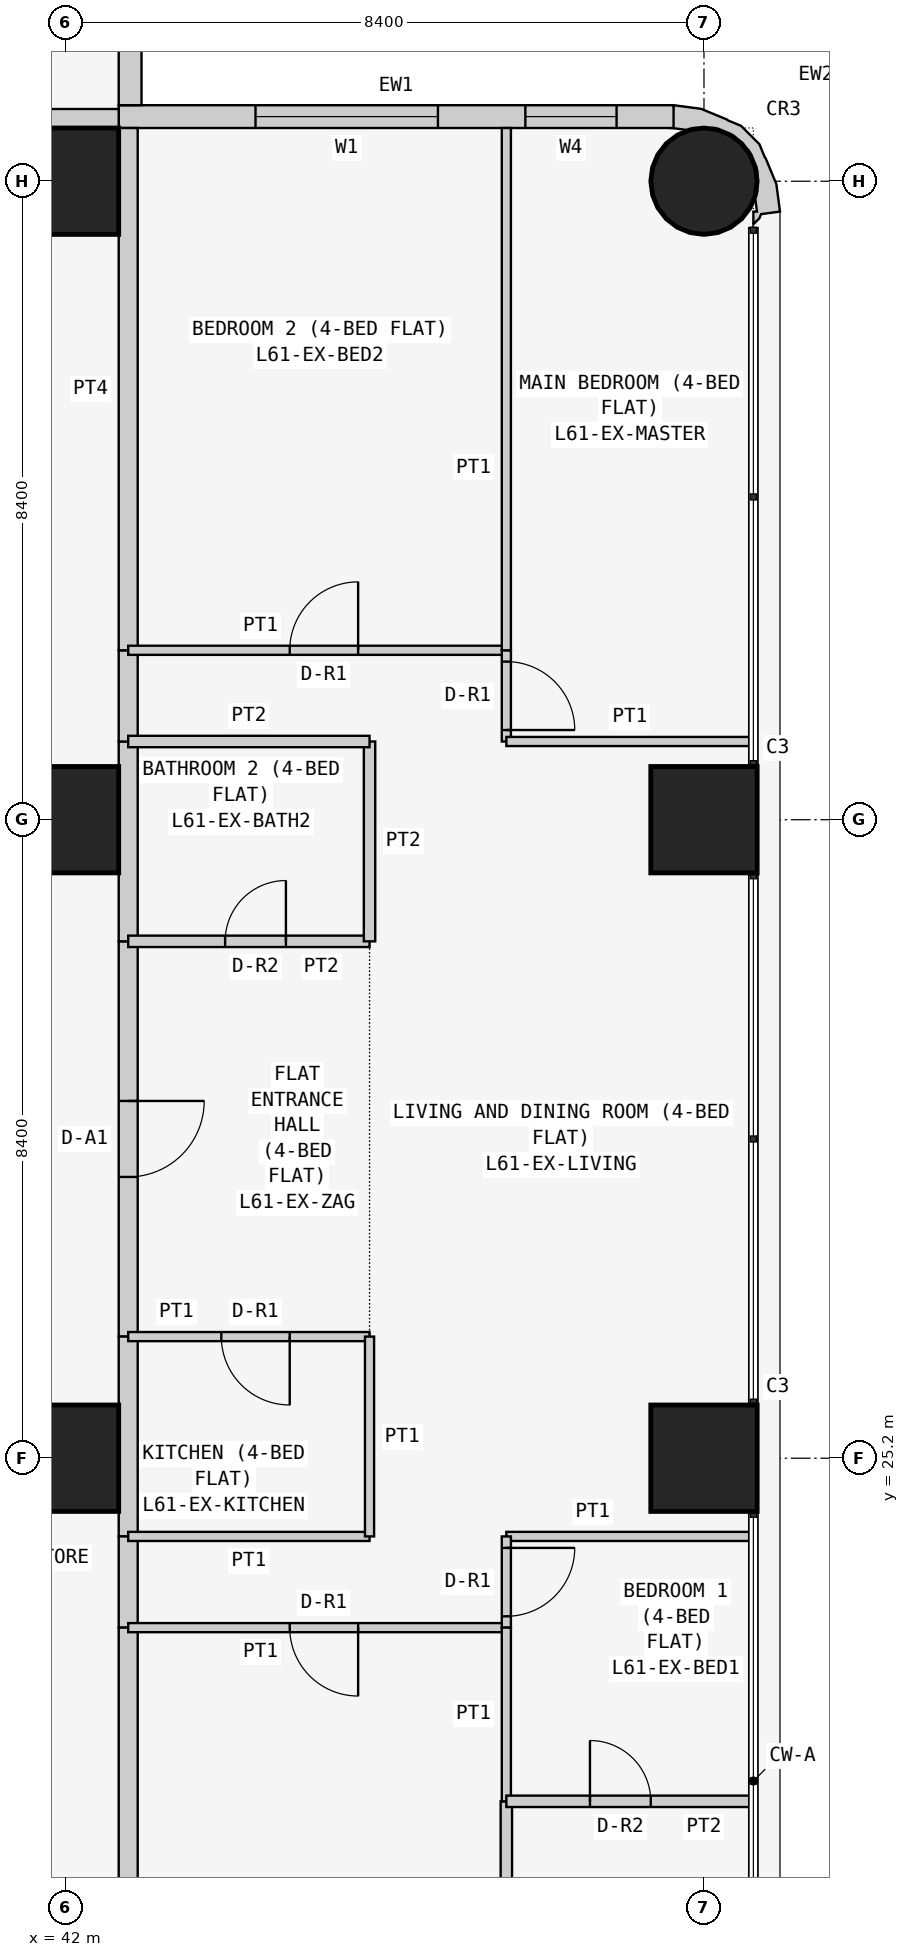
"""IFC4 building model, lengths in metres.
Left out: names, types, materials, properties, quantities, classifications, styles, units other than length and angle.
Written with IfcOpenShell. Run it as: python <this file> out.ifc"""

import sys

from ifc_helpers import new_model, si_unit, direction, frame, frame_2d, origin, origin_2d, place, context, subcontext, project, spatial, polyline, rectangle, circle, outline, extrude, element, fill, save


model = new_model("IFC4")
c1 = context("Model", 3, precision=1e-05, world=origin(), true_north=direction((0.0, 1.0)))
c2 = subcontext(c1, "Body", "Model", "MODEL_VIEW")
j1 = project(units=[si_unit("LENGTHUNIT", "METRE"), si_unit("PLANEANGLEUNIT", "RADIAN")], contexts=[c1])
p1 = place(None, origin())
s1 = spatial("IfcSite", under=j1, at=p1, CompositionType="ELEMENT")
p2 = place(p1, origin())
s2 = spatial("IfcBuilding", under=s1, at=p2, CompositionType="ELEMENT")
p3 = place(p2, frame((0.0, 0.0, 233.7)))
s3 = spatial("IfcBuildingStorey", under=s2, at=p3, CompositionType="ELEMENT", Elevation=233.7)
for number, where, z_axis, x_axis in (
    (1, (42.0, 25.2, 0.0), (0.0, 0.0, 1.0), (1.0, 0.0, 0.0)),
    (2, (42.0, 33.6, 0.0), (0.0, 0.0, 1.0), (1.0, 0.0, 0.0)),
    (3, (42.0, 42.0, 0.0), (0.0, 0.0, 1.0), (1.0, 0.0, 0.0)),
    (4, (50.4, 25.2, 0.0), (0.0, 0.0, 1.0), (1.0, 0.0, 0.0)),
    (5, (50.4, 33.6, 0.0), (0.0, 0.0, 1.0), (1.0, 0.0, 0.0)),
):
    element("IfcColumn", number, at=place(p3, frame(where, z_axis=z_axis, x_axis=x_axis)), inside=s3, PredefinedType="COLUMN", context=c2, shape_type="SweptSolid", body=[
        extrude(rectangle(XDim=1.4, YDim=1.4, at=origin_2d()), origin(), (0.0, 0.0, 1.0), 3.6),
    ])
p4 = place(p3, frame((50.4, 42.0, 0.0), z_axis=(0.0, 0.0, 1.0), x_axis=(1.0, 0.0, 0.0)))
e6 = element("IfcColumn", 6, at=p4, inside=s3, PredefinedType="COLUMN", context=c2, shape_type="SweptSolid", body=[
    extrude(circle(Radius=0.7, at=origin_2d()), origin(), (0.0, 0.0, 1.0), 3.6),
])
p5 = place(p3, frame((50.0, 42.85, 0.0), z_axis=(0.0, 0.0, 1.0), x_axis=(-1.0, 0.0, 0.0)))
e7 = element("IfcWall", 7, at=p5, inside=s3, PredefinedType="SOLIDWALL", context=c2, shape_type="SweptSolid", body=[
    extrude(rectangle(XDim=7.3, YDim=0.3, at=frame_2d((3.65, 0.0))), origin(), (0.0, 0.0, 1.0), 3.45),
])
p6 = place(p5, frame((3.1, 0.0, 0.9)))
e8 = element("IfcOpeningElement", 8, at=p6, cuts=e7, PredefinedType="OPENING", context=c2, shape_type="SweptSolid", body=[
    extrude(rectangle(XDim=2.4, YDim=1.5, at=frame_2d((1.2, 0.75))), frame((0.0, 0.16, 0.0), z_axis=(0.0, -1.0, 0.0), x_axis=(1.0, 0.0, 0.0)), (0.0, 0.0, 1.0), 0.32),
])
p7 = place(p5, frame((0.75, 0.0, 0.9)))
e9 = element("IfcOpeningElement", 9, at=p7, cuts=e7, PredefinedType="OPENING", context=c2, shape_type="SweptSolid", body=[
    extrude(rectangle(XDim=1.2, YDim=1.5, at=frame_2d((0.6, 0.75))), frame((0.0, 0.16, 0.0), z_axis=(0.0, -1.0, 0.0), x_axis=(1.0, 0.0, 0.0)), (0.0, 0.0, 1.0), 0.32),
])
p8 = place(p3, frame((42.85, 43.0, 0.0), z_axis=(0.0, 0.0, 1.0), x_axis=(0.0, 1.0, 0.0)))
e10 = element("IfcWall", 10, at=p8, inside=s3, PredefinedType="SOLIDWALL", context=c2, shape_type="SweptSolid", body=[
    extrude(rectangle(XDim=7.0, YDim=0.3, at=frame_2d((3.5, 0.0))), origin(), (0.0, 0.0, 1.0), 3.45),
])
p9 = place(p8, frame((1.5, 0.0, 0.9)))
e11 = element("IfcOpeningElement", 11, at=p9, cuts=e10, PredefinedType="OPENING", context=c2, shape_type="SweptSolid", body=[
    extrude(rectangle(XDim=2.4, YDim=1.5, at=frame_2d((1.2, 0.75))), frame((0.0, 0.16, 0.0), z_axis=(0.0, -1.0, 0.0), x_axis=(1.0, 0.0, 0.0)), (0.0, 0.0, 1.0), 0.32),
])
p10 = place(p8, frame((5.05, 0.0, 0.9)))
e12 = element("IfcOpeningElement", 12, at=p10, cuts=e10, PredefinedType="OPENING", context=c2, shape_type="SweptSolid", body=[
    extrude(rectangle(XDim=1.2, YDim=1.5, at=frame_2d((0.6, 0.75))), frame((0.0, 0.16, 0.0), z_axis=(0.0, -1.0, 0.0), x_axis=(1.0, 0.0, 0.0)), (0.0, 0.0, 1.0), 0.32),
])
p11 = place(p3, frame((50.988, 41.488, 0.0), z_axis=(0.0, 0.0, 1.0), x_axis=(0.898030234854, 0.439933741929, 0.0)))
e13 = element("IfcWall", 13, at=p11, inside=s3, PredefinedType="SOLIDWALL", context=c2, shape_type="SweptSolid", body=[
    extrude(outline(polyline([(0.138, -0.04), (0.182, -0.0), (0.419, -0.08), (0.536, 0.266), (0.559, 0.631), (0.555, 0.651), (0.566, 0.836), (0.455, 1.159), (0.333, 1.298), (0.324, 1.317), (0.082, 1.591), (-0.222, 1.793), (-0.39, 1.541), (-0.372, 1.532), (-0.195, 1.414), (-0.12, 1.41), (0.131, 1.287), (0.315, 1.078), (0.406, 0.814), (0.388, 0.536), (0.265, 0.285), (0.209, 0.235), (0.148, 0.053), (0.105, 0.074), (0.032, -0.076), (0.138, -0.04)])), origin(), (0.0, 0.0, 1.0), 3.45),
])
p12 = place(p3, frame((35.829, 42.825, 0.0), z_axis=(0.0, 0.0, 1.0), x_axis=(1.0, 0.0, 0.0)))
e14 = element("IfcWall", 14, at=p12, inside=s3, PredefinedType="PARTITIONING", context=c2, shape_type="SweptSolid", body=[
    extrude(rectangle(XDim=6.871, YDim=0.25, at=frame_2d((3.436, 0.0))), origin(), (0.0, 0.0, 1.0), 3.45),
])
p13 = place(p3, frame((42.825, 32.0, 0.0), z_axis=(0.0, 0.0, 1.0), x_axis=(0.0, -1.0, 0.0)))
e15 = element("IfcWall", 15, at=p13, inside=s3, PredefinedType="PARTITIONING", context=c2, shape_type="SweptSolid", body=[
    extrude(rectangle(XDim=5.2, YDim=0.25, at=frame_2d((2.6, 0.0))), origin(), (0.0, 0.0, 1.0), 3.45),
])
p14 = place(p13, frame((2.1, 0.0, 0.0)))
e16 = element("IfcOpeningElement", 16, at=p14, cuts=e15, PredefinedType="OPENING", context=c2, shape_type="SweptSolid", body=[
    extrude(rectangle(XDim=1.0, YDim=2.1, at=frame_2d((0.5, 1.05))), frame((0.0, 0.135, 0.0), z_axis=(0.0, -1.0, 0.0), x_axis=(1.0, 0.0, 0.0)), (0.0, 0.0, 1.0), 0.27),
])
p15 = place(p3, frame((42.825, 34.629, 0.0), z_axis=(0.0, 0.0, 1.0), x_axis=(0.0, -1.0, 0.0)))
e17 = element("IfcWall", 17, at=p15, inside=s3, PredefinedType="PARTITIONING", context=c2, shape_type="SweptSolid", body=[
    extrude(rectangle(XDim=2.629, YDim=0.25, at=frame_2d((1.314, 0.0))), origin(), (0.0, 0.0, 1.0), 3.45),
])
p16 = place(p3, frame((42.825, 26.8, 0.0), z_axis=(0.0, 0.0, 1.0), x_axis=(0.0, -1.0, 0.0)))
e18 = element("IfcWall", 18, at=p16, inside=s3, PredefinedType="PARTITIONING", context=c2, shape_type="SweptSolid", body=[
    extrude(rectangle(XDim=2.629, YDim=0.25, at=frame_2d((1.314, 0.0))), origin(), (0.0, 0.0, 1.0), 3.45),
])
p17 = place(p3, frame((42.825, 24.171, 0.0), z_axis=(0.0, 0.0, 1.0), x_axis=(0.0, -1.0, 0.0)))
e19 = element("IfcWall", 19, at=p17, inside=s3, PredefinedType="PARTITIONING", context=c2, shape_type="SweptSolid", body=[
    extrude(rectangle(XDim=1.2, YDim=0.25, at=frame_2d((0.6, 0.0))), origin(), (0.0, 0.0, 1.0), 3.45),
])
p18 = place(p3, frame((42.825, 35.829, 0.0), z_axis=(0.0, 0.0, 1.0), x_axis=(0.0, -1.0, 0.0)))
e20 = element("IfcWall", 20, at=p18, inside=s3, PredefinedType="PARTITIONING", context=c2, shape_type="SweptSolid", body=[
    extrude(rectangle(XDim=1.2, YDim=0.25, at=frame_2d((0.6, 0.0))), origin(), (0.0, 0.0, 1.0), 3.45),
])
for number, where, z_axis, x_axis in (
    (21, (42.825, 42.7, 0.0), (0.0, 0.0, 1.0), (0.0, -1.0, 0.0)),
    (22, (42.825, 22.971, 0.0), (0.0, 0.0, 1.0), (0.0, -1.0, 0.0)),
):
    element("IfcWall", number, at=place(p3, frame(where, z_axis=z_axis, x_axis=x_axis)), inside=s3, PredefinedType="PARTITIONING", context=c2, shape_type="SweptSolid", body=[
        extrude(rectangle(XDim=6.871, YDim=0.25, at=frame_2d((3.436, 0.0))), origin(), (0.0, 0.0, 1.0), 3.45),
    ])
p19 = place(p3, frame((46.0, 32.0, 0.0), z_axis=(0.0, 0.0, 1.0), x_axis=(-1.0, 0.0, 0.0)))
e23 = element("IfcWall", 23, at=p19, inside=s3, PredefinedType="PARTITIONING", context=c2, shape_type="SweptSolid", body=[
    extrude(rectangle(XDim=3.175, YDim=0.15, at=frame_2d((1.587, 0.0))), origin(), (0.0, 0.0, 1.0), 3.45),
])
p20 = place(p19, frame((1.1, 0.0, 0.0)))
e24 = element("IfcOpeningElement", 24, at=p20, cuts=e23, PredefinedType="OPENING", context=c2, shape_type="SweptSolid", body=[
    extrude(rectangle(XDim=0.8, YDim=2.1, at=frame_2d((0.4, 1.05))), frame((0.0, 0.085, 0.0), z_axis=(0.0, -1.0, 0.0), x_axis=(1.0, 0.0, 0.0)), (0.0, 0.0, 1.0), 0.17),
])
p21 = place(p3, frame((42.825, 26.8, 0.0), z_axis=(0.0, 0.0, 1.0), x_axis=(1.0, 0.0, 0.0)))
e25 = element("IfcWall", 25, at=p21, inside=s3, PredefinedType="PARTITIONING", context=c2, shape_type="SweptSolid", body=[
    extrude(rectangle(XDim=3.175, YDim=0.12, at=frame_2d((1.587, 0.0))), origin(), (0.0, 0.0, 1.0), 3.45),
])
p22 = place(p21, frame((1.225, 0.0, 0.0)))
e26 = element("IfcOpeningElement", 26, at=p22, cuts=e25, PredefinedType="OPENING", context=c2, shape_type="SweptSolid", body=[
    extrude(rectangle(XDim=0.9, YDim=2.1, at=frame_2d((0.45, 1.05))), frame((0.0, 0.07, 0.0), z_axis=(0.0, -1.0, 0.0), x_axis=(1.0, 0.0, 0.0)), (0.0, 0.0, 1.0), 0.14),
])
p23 = place(p3, frame((46.0, 32.0, 0.0), z_axis=(0.0, 0.0, 1.0), x_axis=(0.0, 1.0, 0.0)))
e27 = element("IfcWall", 27, at=p23, inside=s3, PredefinedType="PARTITIONING", context=c2, shape_type="SweptSolid", body=[
    extrude(rectangle(XDim=2.629, YDim=0.15, at=frame_2d((1.314, 0.0))), origin(), (0.0, 0.0, 1.0), 3.45),
])
p24 = place(p3, frame((46.0, 34.629, 0.0), z_axis=(0.0, 0.0, 1.0), x_axis=(-1.0, 0.0, 0.0)))
e28 = element("IfcWall", 28, at=p24, inside=s3, PredefinedType="PARTITIONING", context=c2, shape_type="SweptSolid", body=[
    extrude(rectangle(XDim=3.175, YDim=0.15, at=frame_2d((1.587, 0.0))), origin(), (0.0, 0.0, 1.0), 3.45),
])
p25 = place(p3, frame((42.825, 24.171, 0.0), z_axis=(0.0, 0.0, 1.0), x_axis=(1.0, 0.0, 0.0)))
e29 = element("IfcWall", 29, at=p25, inside=s3, PredefinedType="PARTITIONING", context=c2, shape_type="SweptSolid", body=[
    extrude(rectangle(XDim=3.175, YDim=0.12, at=frame_2d((1.587, 0.0))), origin(), (0.0, 0.0, 1.0), 3.45),
])
p26 = place(p3, frame((46.0, 24.171, 0.0), z_axis=(0.0, 0.0, 1.0), x_axis=(0.0, 1.0, 0.0)))
e30 = element("IfcWall", 30, at=p26, inside=s3, PredefinedType="PARTITIONING", context=c2, shape_type="SweptSolid", body=[
    extrude(rectangle(XDim=2.629, YDim=0.12, at=frame_2d((1.314, 0.0))), origin(), (0.0, 0.0, 1.0), 3.45),
])
p27 = place(p3, frame((42.825, 35.829, 0.0), z_axis=(0.0, 0.0, 1.0), x_axis=(1.0, 0.0, 0.0)))
e31 = element("IfcWall", 31, at=p27, inside=s3, PredefinedType="PARTITIONING", context=c2, shape_type="SweptSolid", body=[
    extrude(rectangle(XDim=4.975, YDim=0.12, at=frame_2d((2.488, 0.0))), origin(), (0.0, 0.0, 1.0), 3.45),
])
p28 = place(p27, frame((2.125, 0.0, 0.0)))
e32 = element("IfcOpeningElement", 32, at=p28, cuts=e31, PredefinedType="OPENING", context=c2, shape_type="SweptSolid", body=[
    extrude(rectangle(XDim=0.9, YDim=2.1, at=frame_2d((0.45, 1.05))), frame((0.0, 0.07, 0.0), z_axis=(0.0, -1.0, 0.0), x_axis=(1.0, 0.0, 0.0)), (0.0, 0.0, 1.0), 0.14),
])
p29 = place(p3, frame((47.8, 35.829, 0.0), z_axis=(0.0, 0.0, 1.0), x_axis=(0.0, -1.0, 0.0)))
e33 = element("IfcWall", 33, at=p29, inside=s3, PredefinedType="PARTITIONING", context=c2, shape_type="SweptSolid", body=[
    extrude(rectangle(XDim=1.2, YDim=0.12, at=frame_2d((0.6, 0.0))), origin(), (0.0, 0.0, 1.0), 3.45),
])
p30 = place(p29, frame((0.149, 0.0, 0.0)))
e34 = element("IfcOpeningElement", 34, at=p30, cuts=e33, PredefinedType="OPENING", context=c2, shape_type="SweptSolid", body=[
    extrude(rectangle(XDim=0.9, YDim=2.1, at=frame_2d((0.45, 1.05))), frame((0.0, 0.07, 0.0), z_axis=(0.0, -1.0, 0.0), x_axis=(1.0, 0.0, 0.0)), (0.0, 0.0, 1.0), 0.14),
])
p31 = place(p3, frame((47.8, 34.629, 0.0), z_axis=(0.0, 0.0, 1.0), x_axis=(1.0, 0.0, 0.0)))
e35 = element("IfcWall", 35, at=p31, inside=s3, PredefinedType="PARTITIONING", context=c2, shape_type="SweptSolid", body=[
    extrude(rectangle(XDim=3.25, YDim=0.12, at=frame_2d((1.625, 0.0))), origin(), (0.0, 0.0, 1.0), 3.45),
])
p32 = place(p3, frame((47.8, 22.971, 0.0), z_axis=(0.0, 0.0, 1.0), x_axis=(-1.0, 0.0, 0.0)))
e36 = element("IfcWall", 36, at=p32, inside=s3, PredefinedType="PARTITIONING", context=c2, shape_type="SweptSolid", body=[
    extrude(rectangle(XDim=4.975, YDim=0.12, at=frame_2d((2.488, 0.0))), origin(), (0.0, 0.0, 1.0), 3.45),
])
p33 = place(p32, frame((1.95, 0.0, 0.0)))
e37 = element("IfcOpeningElement", 37, at=p33, cuts=e36, PredefinedType="OPENING", context=c2, shape_type="SweptSolid", body=[
    extrude(rectangle(XDim=0.9, YDim=2.1, at=frame_2d((0.45, 1.05))), frame((0.0, 0.07, 0.0), z_axis=(0.0, -1.0, 0.0), x_axis=(1.0, 0.0, 0.0)), (0.0, 0.0, 1.0), 0.14),
])
p34 = place(p3, frame((51.05, 24.171, 0.0), z_axis=(0.0, 0.0, 1.0), x_axis=(-1.0, 0.0, 0.0)))
e38 = element("IfcWall", 38, at=p34, inside=s3, PredefinedType="PARTITIONING", context=c2, shape_type="SweptSolid", body=[
    extrude(rectangle(XDim=3.25, YDim=0.12, at=frame_2d((1.625, 0.0))), origin(), (0.0, 0.0, 1.0), 3.45),
])
p35 = place(p3, frame((47.8, 24.171, 0.0), z_axis=(0.0, 0.0, 1.0), x_axis=(0.0, -1.0, 0.0)))
e39 = element("IfcWall", 39, at=p35, inside=s3, PredefinedType="PARTITIONING", context=c2, shape_type="SweptSolid", body=[
    extrude(rectangle(XDim=1.2, YDim=0.12, at=frame_2d((0.6, 0.0))), origin(), (0.0, 0.0, 1.0), 3.45),
])
p36 = place(p35, frame((0.151, 0.0, 0.0)))
e40 = element("IfcOpeningElement", 40, at=p36, cuts=e39, PredefinedType="OPENING", context=c2, shape_type="SweptSolid", body=[
    extrude(rectangle(XDim=0.9, YDim=2.1, at=frame_2d((0.45, 1.05))), frame((0.0, 0.07, 0.0), z_axis=(0.0, -1.0, 0.0), x_axis=(1.0, 0.0, 0.0)), (0.0, 0.0, 1.0), 0.14),
])
p37 = place(p3, frame((47.8, 35.829, 0.0), z_axis=(0.0, 0.0, 1.0), x_axis=(0.0, 1.0, 0.0)))
e41 = element("IfcWall", 41, at=p37, inside=s3, PredefinedType="PARTITIONING", context=c2, shape_type="SweptSolid", body=[
    extrude(rectangle(XDim=6.871, YDim=0.12, at=frame_2d((3.436, 0.0))), origin(), (0.0, 0.0, 1.0), 3.45),
])
p38 = place(p3, frame((47.8, 16.1, 0.0), z_axis=(0.0, 0.0, 1.0), x_axis=(0.0, 1.0, 0.0)))
e42 = element("IfcWall", 42, at=p38, inside=s3, PredefinedType="PARTITIONING", context=c2, shape_type="SweptSolid", body=[
    extrude(rectangle(XDim=4.586, YDim=0.15, at=frame_2d((2.293, 0.0))), origin(), (0.0, 0.0, 1.0), 3.45),
])
p39 = place(p3, frame((47.8, 20.686, 0.0), z_axis=(0.0, 0.0, 1.0), x_axis=(0.0, 1.0, 0.0)))
e43 = element("IfcWall", 43, at=p39, inside=s3, PredefinedType="PARTITIONING", context=c2, shape_type="SweptSolid", body=[
    extrude(rectangle(XDim=2.285, YDim=0.12, at=frame_2d((1.143, 0.0))), origin(), (0.0, 0.0, 1.0), 3.45),
])
p40 = place(p3, frame((51.05, 20.686, 0.0), z_axis=(0.0, 0.0, 1.0), x_axis=(-1.0, 0.0, 0.0)))
e44 = element("IfcWall", 44, at=p40, inside=s3, PredefinedType="PARTITIONING", context=c2, shape_type="SweptSolid", body=[
    extrude(rectangle(XDim=3.25, YDim=0.15, at=frame_2d((1.625, 0.0))), origin(), (0.0, 0.0, 1.0), 3.45),
])
p41 = place(p40, frame((1.35, 0.0, 0.0)))
e45 = element("IfcOpeningElement", 45, at=p41, cuts=e44, PredefinedType="OPENING", context=c2, shape_type="SweptSolid", body=[
    extrude(rectangle(XDim=0.8, YDim=2.1, at=frame_2d((0.4, 1.05))), frame((0.0, 0.085, 0.0), z_axis=(0.0, -1.0, 0.0), x_axis=(1.0, 0.0, 0.0)), (0.0, 0.0, 1.0), 0.17),
])
p42 = place(p6, origin())
e46 = element("IfcWindow", 46, at=p42, inside=s3, PartitioningType="SINGLE_PANEL", PredefinedType="WINDOW", context=c2, shape_type="SweptSolid", body=[
    extrude(rectangle(XDim=2.4, YDim=1.5, at=frame_2d((1.2, 0.75))), frame((0.0, 0.03, 0.0), z_axis=(0.0, -1.0, 0.0), x_axis=(1.0, 0.0, 0.0)), (0.0, 0.0, 1.0), 0.06),
])
fill(e8, e46)
p43 = place(p7, origin())
e47 = element("IfcWindow", 47, at=p43, inside=s3, PartitioningType="SINGLE_PANEL", PredefinedType="WINDOW", context=c2, shape_type="SweptSolid", body=[
    extrude(rectangle(XDim=1.2, YDim=1.5, at=frame_2d((0.6, 0.75))), frame((0.0, 0.03, 0.0), z_axis=(0.0, -1.0, 0.0), x_axis=(1.0, 0.0, 0.0)), (0.0, 0.0, 1.0), 0.06),
])
fill(e9, e47)
p44 = place(p14, origin())
e48 = element("IfcDoor", 48, at=p44, inside=s3, OperationType="SINGLE_SWING_LEFT", PredefinedType="DOOR", context=c2, shape_type="SweptSolid", body=[
    extrude(rectangle(XDim=1.0, YDim=2.1, at=frame_2d((0.5, 1.05))), frame((0.0, 0.025, 0.0), z_axis=(0.0, -1.0, 0.0), x_axis=(1.0, 0.0, 0.0)), (0.0, 0.0, 1.0), 0.05),
])
fill(e16, e48)
p45 = place(p20, frame((0.8, 0.0, 0.0), z_axis=(0.0, 0.0, 1.0), x_axis=(-1.0, 0.0, 0.0)))
e49 = element("IfcDoor", 49, at=p45, inside=s3, OperationType="SINGLE_SWING_RIGHT", PredefinedType="DOOR", context=c2, shape_type="SweptSolid", body=[
    extrude(rectangle(XDim=0.8, YDim=2.1, at=frame_2d((0.4, 1.05))), frame((0.0, 0.025, 0.0), z_axis=(0.0, -1.0, 0.0), x_axis=(1.0, 0.0, 0.0)), (0.0, 0.0, 1.0), 0.05),
])
fill(e24, e49)
p46 = place(p22, frame((0.9, 0.0, 0.0), z_axis=(0.0, 0.0, 1.0), x_axis=(-1.0, 0.0, 0.0)))
e50 = element("IfcDoor", 50, at=p46, inside=s3, OperationType="SINGLE_SWING_LEFT", PredefinedType="DOOR", context=c2, shape_type="SweptSolid", body=[
    extrude(rectangle(XDim=0.9, YDim=2.1, at=frame_2d((0.45, 1.05))), frame((0.0, 0.025, 0.0), z_axis=(0.0, -1.0, 0.0), x_axis=(1.0, 0.0, 0.0)), (0.0, 0.0, 1.0), 0.05),
])
fill(e26, e50)
p47 = place(p28, origin())
e51 = element("IfcDoor", 51, at=p47, inside=s3, OperationType="SINGLE_SWING_RIGHT", PredefinedType="DOOR", context=c2, shape_type="SweptSolid", body=[
    extrude(rectangle(XDim=0.9, YDim=2.1, at=frame_2d((0.45, 1.05))), frame((0.0, 0.025, 0.0), z_axis=(0.0, -1.0, 0.0), x_axis=(1.0, 0.0, 0.0)), (0.0, 0.0, 1.0), 0.05),
])
fill(e32, e51)
p48 = place(p30, origin())
e52 = element("IfcDoor", 52, at=p48, inside=s3, OperationType="SINGLE_SWING_RIGHT", PredefinedType="DOOR", context=c2, shape_type="SweptSolid", body=[
    extrude(rectangle(XDim=0.9, YDim=2.1, at=frame_2d((0.45, 1.05))), frame((0.0, 0.025, 0.0), z_axis=(0.0, -1.0, 0.0), x_axis=(1.0, 0.0, 0.0)), (0.0, 0.0, 1.0), 0.05),
])
fill(e34, e52)
p49 = place(p33, origin())
e53 = element("IfcDoor", 53, at=p49, inside=s3, OperationType="SINGLE_SWING_LEFT", PredefinedType="DOOR", context=c2, shape_type="SweptSolid", body=[
    extrude(rectangle(XDim=0.9, YDim=2.1, at=frame_2d((0.45, 1.05))), frame((0.0, 0.025, 0.0), z_axis=(0.0, -1.0, 0.0), x_axis=(1.0, 0.0, 0.0)), (0.0, 0.0, 1.0), 0.05),
])
fill(e37, e53)
p50 = place(p36, origin())
e54 = element("IfcDoor", 54, at=p50, inside=s3, OperationType="SINGLE_SWING_LEFT", PredefinedType="DOOR", context=c2, shape_type="SweptSolid", body=[
    extrude(rectangle(XDim=0.9, YDim=2.1, at=frame_2d((0.45, 1.05))), frame((0.0, 0.025, 0.0), z_axis=(0.0, -1.0, 0.0), x_axis=(1.0, 0.0, 0.0)), (0.0, 0.0, 1.0), 0.05),
])
fill(e40, e54)
p51 = place(p41, frame((0.8, 0.0, 0.0), z_axis=(0.0, 0.0, 1.0), x_axis=(-1.0, 0.0, 0.0)))
e55 = element("IfcDoor", 55, at=p51, inside=s3, OperationType="SINGLE_SWING_LEFT", PredefinedType="DOOR", context=c2, shape_type="SweptSolid", body=[
    extrude(rectangle(XDim=0.8, YDim=2.1, at=frame_2d((0.4, 1.05))), frame((0.0, 0.025, 0.0), z_axis=(0.0, -1.0, 0.0), x_axis=(1.0, 0.0, 0.0)), (0.0, 0.0, 1.0), 0.05),
])
fill(e45, e55)
save(model, sys.argv[1])
